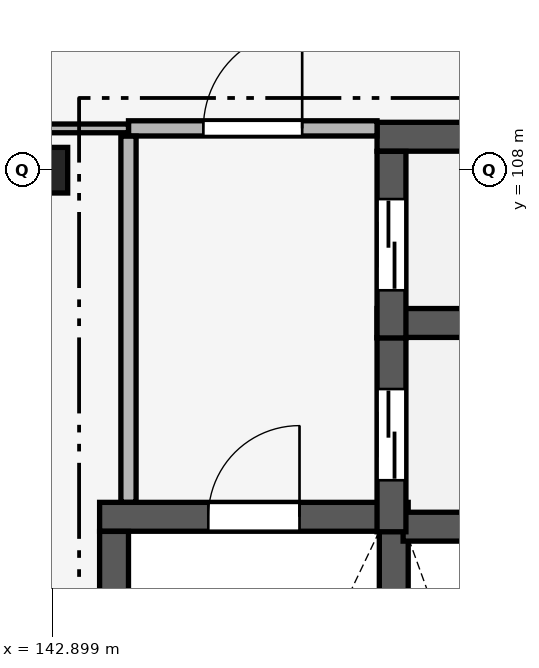
"""IFC4 building model, lengths in metres.
Left out: names, types, materials, properties, quantities, classifications, styles, units other than length and angle.
Written with IfcOpenShell. Run it as: python <this file> out.ifc"""

import sys

from ifc_helpers import new_model, si_unit, direction, frame, frame_2d, origin, origin_2d, place, context, subcontext, project, spatial, rectangle, extrude, element, fill, save


model = new_model("IFC4")
c1 = context("Model", 3, precision=1e-05, world=origin(), true_north=direction((0.0, 1.0)))
c2 = subcontext(c1, "Body", "Model", "MODEL_VIEW")
j1 = project(units=[si_unit("LENGTHUNIT", "METRE"), si_unit("PLANEANGLEUNIT", "RADIAN")], contexts=[c1])
p1 = place(None, origin())
s1 = spatial("IfcSite", under=j1, at=p1, CompositionType="ELEMENT")
p2 = place(p1, origin())
s2 = spatial("IfcBuilding", under=s1, at=p2, CompositionType="ELEMENT")
p3 = place(p2, frame((0.0, 0.0, 42.0)))
s3 = spatial("IfcBuildingStorey", under=s2, at=p3, CompositionType="ELEMENT", Elevation=42.0)
p4 = place(p3, frame((142.8, 108.0, 0.0), z_axis=(0.0, 0.0, 1.0), x_axis=(1.0, 0.0, 0.0)))
e1 = element("IfcColumn", 1, at=p4, inside=s3, PredefinedType="COLUMN", context=c2, shape_type="SweptSolid", body=[
    extrude(rectangle(XDim=0.6, YDim=0.6, at=origin_2d()), origin(), (0.0, 0.0, 1.0), 3.9),
])
p5 = place(p3, frame((143.52, 103.44, 0.0), z_axis=(0.0, 0.0, 1.0), x_axis=(1.0, 0.0, 0.0)))
e2 = element("IfcWall", 2, at=p5, inside=s3, PredefinedType="SHEAR", context=c2, shape_type="SweptSolid", body=[
    extrude(rectangle(XDim=4.06, YDim=0.38, at=frame_2d((2.03, 0.0))), origin(), (0.0, 0.0, 1.0), 3.66),
])
p6 = place(p5, frame((1.43, 0.0, 0.0)))
e3 = element("IfcOpeningElement", 3, at=p6, cuts=e2, PredefinedType="OPENING", context=c2, shape_type="SweptSolid", body=[
    extrude(rectangle(XDim=1.2, YDim=2.2, at=frame_2d((0.6, 1.1))), frame((0.0, 0.205, 0.0), z_axis=(0.0, -1.0, 0.0), x_axis=(1.0, 0.0, 0.0)), (0.0, 0.0, 1.0), 0.41),
])
for number, where, z_axis, x_axis in (
    (4, (143.71, 96.352, 0.0), (0.0, 0.0, 1.0), (0.0, 1.0, 0.0)),
    (5, (147.39, 96.352, 0.0), (0.0, 0.0, 1.0), (0.0, 1.0, 0.0)),
):
    element("IfcWall", number, at=place(p3, frame(where, z_axis=z_axis, x_axis=x_axis)), inside=s3, PredefinedType="SHEAR", context=c2, shape_type="SweptSolid", body=[
        extrude(rectangle(XDim=6.896, YDim=0.38, at=frame_2d((3.448, 0.0))), origin(), (0.0, 0.0, 1.0), 3.66),
    ])
p7 = place(p3, frame((147.513, 103.31, 0.0), z_axis=(0.0, 0.0, 1.0), x_axis=(1.0, 0.0, 0.0)))
e6 = element("IfcWall", 6, at=p7, inside=s3, PredefinedType="SHEAR", context=c2, shape_type="SweptSolid", body=[
    extrude(rectangle(XDim=2.917, YDim=0.38, at=frame_2d((1.458, 0.0))), origin(), (0.0, 0.0, 1.0), 3.9),
])
p8 = place(p3, frame((147.17, 105.99, 0.0), z_axis=(0.0, 0.0, 1.0), x_axis=(1.0, 0.0, 0.0)))
e7 = element("IfcWall", 7, at=p8, inside=s3, PredefinedType="SHEAR", context=c2, shape_type="SweptSolid", body=[
    extrude(rectangle(XDim=3.26, YDim=0.38, at=frame_2d((1.63, 0.0))), origin(), (0.0, 0.0, 1.0), 3.9),
])
p9 = place(p3, frame((147.36, 103.243, 0.0), z_axis=(0.0, 0.0, 1.0), x_axis=(0.0, 1.0, 0.0)))
e8 = element("IfcWall", 8, at=p9, inside=s3, PredefinedType="SHEAR", context=c2, shape_type="SweptSolid", body=[
    extrude(rectangle(XDim=2.555, YDim=0.38, at=frame_2d((1.278, 0.0))), origin(), (0.0, 0.0, 1.0), 3.9),
])
p10 = place(p9, frame((0.678, 0.0, 0.0)))
e9 = element("IfcOpeningElement", 9, at=p10, cuts=e8, PredefinedType="OPENING", context=c2, shape_type="SweptSolid", body=[
    extrude(rectangle(XDim=1.2, YDim=2.15, at=frame_2d((0.6, 1.075))), frame((0.0, 0.205, 0.0), z_axis=(0.0, -1.0, 0.0), x_axis=(1.0, 0.0, 0.0)), (0.0, 0.0, 1.0), 0.41),
])
p11 = place(p3, frame((147.17, 108.44, 0.0), z_axis=(0.0, 0.0, 1.0), x_axis=(1.0, 0.0, 0.0)))
e10 = element("IfcWall", 10, at=p11, inside=s3, PredefinedType="SHEAR", context=c2, shape_type="SweptSolid", body=[
    extrude(rectangle(XDim=3.26, YDim=0.38, at=frame_2d((1.63, 0.0))), origin(), (0.0, 0.0, 1.0), 3.9),
])
p12 = place(p3, frame((147.36, 105.793, 0.0), z_axis=(0.0, 0.0, 1.0), x_axis=(0.0, 1.0, 0.0)))
e11 = element("IfcWall", 11, at=p12, inside=s3, PredefinedType="SHEAR", context=c2, shape_type="SweptSolid", body=[
    extrude(rectangle(XDim=2.455, YDim=0.38, at=frame_2d((1.228, 0.0))), origin(), (0.0, 0.0, 1.0), 3.9),
])
p13 = place(p12, frame((0.627, 0.0, 0.0)))
e12 = element("IfcOpeningElement", 12, at=p13, cuts=e11, PredefinedType="OPENING", context=c2, shape_type="SweptSolid", body=[
    extrude(rectangle(XDim=1.2, YDim=2.15, at=frame_2d((0.6, 1.075))), frame((0.0, 0.205, 0.0), z_axis=(0.0, -1.0, 0.0), x_axis=(1.0, 0.0, 0.0)), (0.0, 0.0, 1.0), 0.41),
])
p14 = place(p3, frame((143.9, 108.55, 0.0), z_axis=(0.0, 0.0, 1.0), x_axis=(1.0, 0.0, 0.0)))
e13 = element("IfcWall", 13, at=p14, inside=s3, PredefinedType="PARTITIONING", context=c2, shape_type="SweptSolid", body=[
    extrude(rectangle(XDim=3.27, YDim=0.2, at=frame_2d((1.635, 0.0))), origin(), (0.0, 0.0, 1.0), 3.66),
])
p15 = place(p14, frame((0.985, 0.0, 0.0)))
e14 = element("IfcOpeningElement", 14, at=p15, cuts=e13, PredefinedType="OPENING", context=c2, shape_type="SweptSolid", body=[
    extrude(rectangle(XDim=1.3, YDim=2.2, at=frame_2d((0.65, 1.1))), frame((0.0, 0.115, 0.0), z_axis=(0.0, -1.0, 0.0), x_axis=(1.0, 0.0, 0.0)), (0.0, 0.0, 1.0), 0.23),
])
p16 = place(p3, frame((142.509, 108.55, 0.0), z_axis=(0.0, 0.0, 1.0), x_axis=(1.0, 0.0, 0.0)))
e15 = element("IfcWall", 15, at=p16, inside=s3, PredefinedType="PARTITIONING", context=c2, shape_type="SweptSolid", body=[
    extrude(rectangle(XDim=1.391, YDim=0.115, at=frame_2d((0.695, 0.0))), origin(), (0.0, 0.0, 1.0), 3.11),
])
p17 = place(p3, frame((143.9, 103.632, 0.0), z_axis=(0.0, 0.0, 1.0), x_axis=(0.0, 1.0, 0.0)))
e16 = element("IfcWall", 16, at=p17, inside=s3, PredefinedType="PARTITIONING", context=c2, shape_type="SweptSolid", body=[
    extrude(rectangle(XDim=4.816, YDim=0.2, at=frame_2d((2.408, 0.0))), origin(), (0.0, 0.0, 1.0), 2.96),
])
p18 = place(p6, origin())
e17 = element("IfcDoor", 17, at=p18, inside=s3, OperationType="SINGLE_SWING_RIGHT", PredefinedType="DOOR", context=c2, shape_type="SweptSolid", body=[
    extrude(rectangle(XDim=1.2, YDim=2.2, at=frame_2d((0.6, 1.1))), frame((0.0, 0.025, 0.0), z_axis=(0.0, -1.0, 0.0), x_axis=(1.0, 0.0, 0.0)), (0.0, 0.0, 1.0), 0.05),
])
fill(e3, e17)
p19 = place(p10, origin())
e18 = element("IfcDoor", 18, at=p19, inside=s3, OperationType="DOUBLE_DOOR_SLIDING", PredefinedType="DOOR", context=c2, shape_type="SweptSolid", body=[
    extrude(rectangle(XDim=1.2, YDim=2.15, at=frame_2d((0.6, 1.075))), frame((0.0, 0.025, 0.0), z_axis=(0.0, -1.0, 0.0), x_axis=(1.0, 0.0, 0.0)), (0.0, 0.0, 1.0), 0.05),
])
fill(e9, e18)
p20 = place(p13, origin())
e19 = element("IfcDoor", 19, at=p20, inside=s3, OperationType="DOUBLE_DOOR_SLIDING", PredefinedType="DOOR", context=c2, shape_type="SweptSolid", body=[
    extrude(rectangle(XDim=1.2, YDim=2.15, at=frame_2d((0.6, 1.075))), frame((0.0, 0.025, 0.0), z_axis=(0.0, -1.0, 0.0), x_axis=(1.0, 0.0, 0.0)), (0.0, 0.0, 1.0), 0.05),
])
fill(e12, e19)
p21 = place(p15, origin())
e20 = element("IfcDoor", 20, at=p21, inside=s3, OperationType="SINGLE_SWING_RIGHT", PredefinedType="DOOR", context=c2, shape_type="SweptSolid", body=[
    extrude(rectangle(XDim=1.3, YDim=2.2, at=frame_2d((0.65, 1.1))), frame((0.0, 0.025, 0.0), z_axis=(0.0, -1.0, 0.0), x_axis=(1.0, 0.0, 0.0)), (0.0, 0.0, 1.0), 0.05),
])
fill(e14, e20)
save(model, sys.argv[1])
